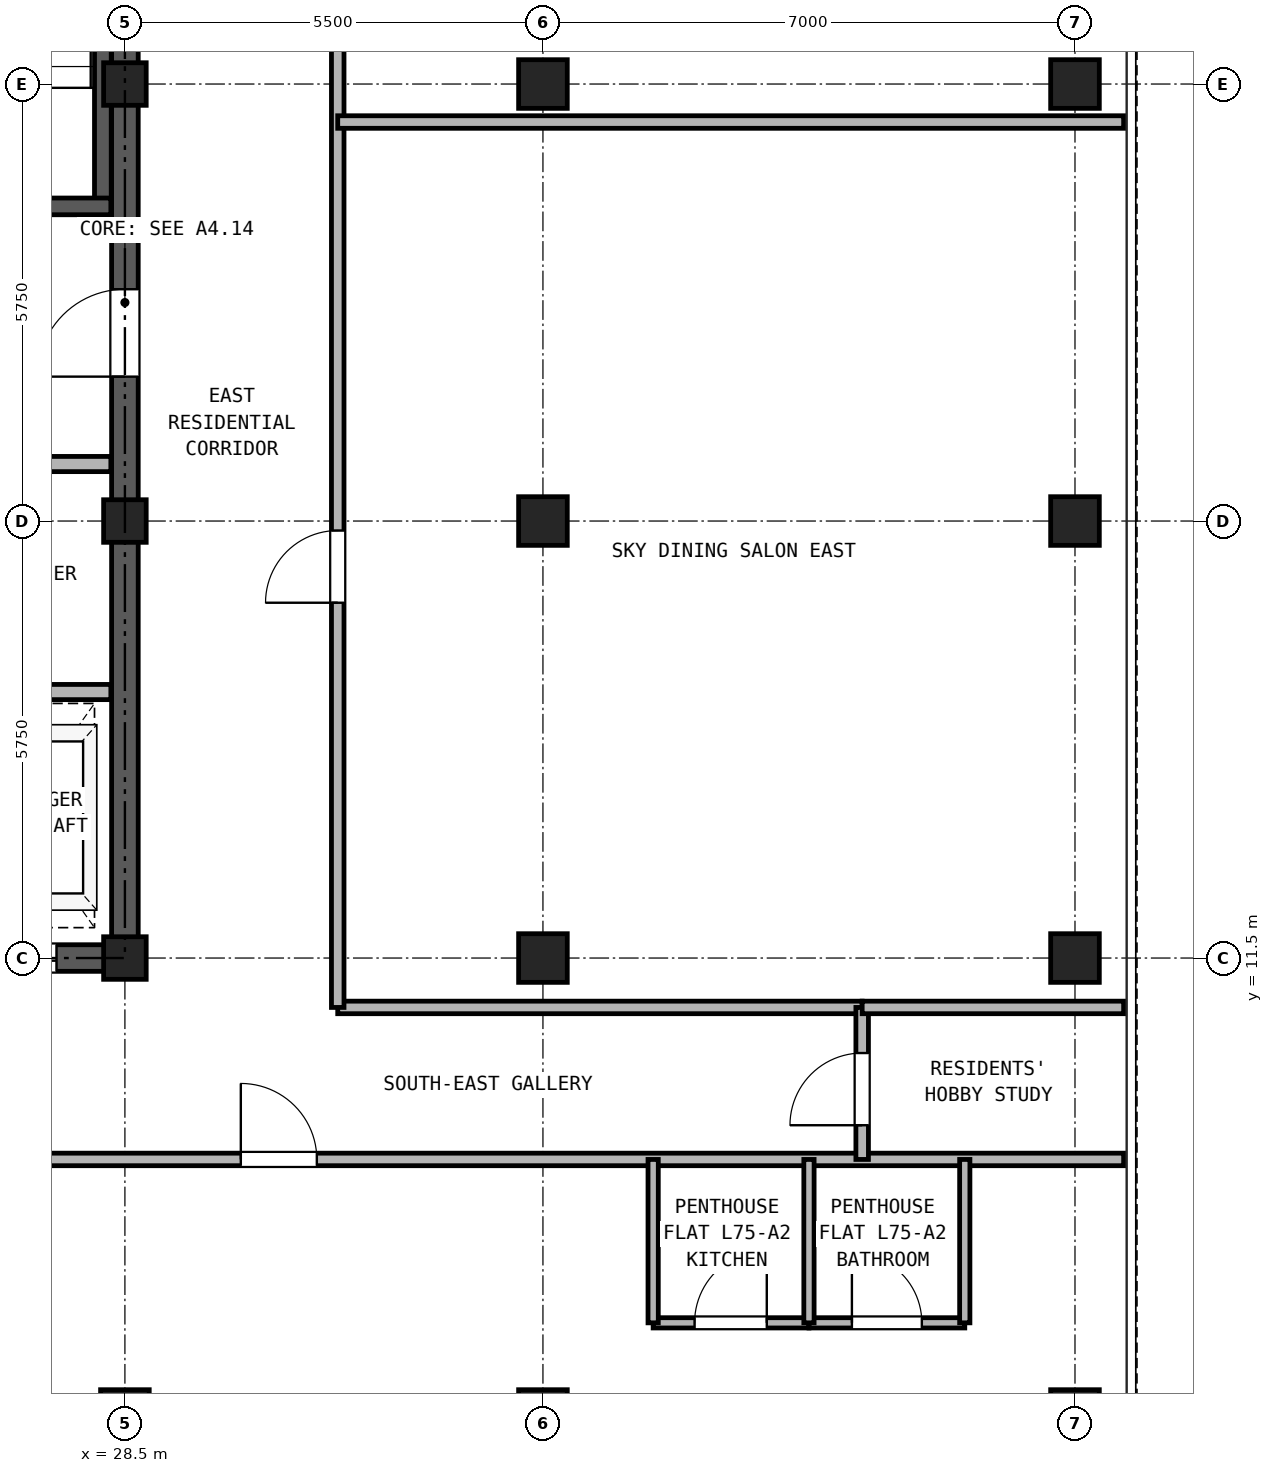
"""IFC4 building model, lengths in metres.
Left out: names, types, materials, properties, quantities, classifications, styles, units other than length and angle.
Written with IfcOpenShell. Run it as: python <this file> out.ifc"""

import sys

from ifc_helpers import new_model, si_unit, direction, frame, frame_2d, origin, origin_2d, place, context, subcontext, project, spatial, rectangle, hollow_rectangle, extrude, source, transform, mapped, element, fill, save


model = new_model("IFC4")
c1 = context("Model", 3, precision=1e-05, world=origin(), true_north=direction((0.0, 1.0)))
c2 = subcontext(c1, "Body", "Model", "MODEL_VIEW")
j1 = project(units=[si_unit("LENGTHUNIT", "METRE"), si_unit("PLANEANGLEUNIT", "RADIAN")], contexts=[c1])
p1 = place(None, origin())
s1 = spatial("IfcSite", under=j1, at=p1, CompositionType="ELEMENT")
p2 = place(p1, origin())
s2 = spatial("IfcBuilding", under=s1, at=p2, CompositionType="ELEMENT")
p3 = place(p2, frame((0.0, 0.0, 261.7)))
s3 = spatial("IfcBuildingStorey", under=s2, at=p3, CompositionType="ELEMENT", Elevation=261.7)
m1 = source(origin(), c2, "Body", "SweptSolid", [
    extrude(hollow_rectangle(XDim=0.64, YDim=0.64, WallThickness=0.035, at=origin_2d()), origin(), (0.0, 0.0, 1.0), 2.98),
])
for number, where, z_axis, x_axis in (
    (1, (41.0, 5.5, 0.0), (0.0, 0.0, 1.0), (1.0, 0.0, 0.0)),
    (2, (41.0, 11.5, 0.0), (0.0, 0.0, 1.0), (1.0, 0.0, 0.0)),
    (3, (41.0, 17.25, 0.0), (0.0, 0.0, 1.0), (1.0, 0.0, 0.0)),
    (4, (41.0, 23.0, 0.0), (0.0, 0.0, 1.0), (1.0, 0.0, 0.0)),
    (5, (28.5, 5.5, 0.0), (0.0, 0.0, 1.0), (1.0, 0.0, 0.0)),
):
    element("IfcColumn", number, at=place(p3, frame(where, z_axis=z_axis, x_axis=x_axis)), inside=s3, PredefinedType="COLUMN", context=c2, shape_type="MappedRepresentation", body=[
        mapped(m1, transform((0.0, 0.0, 0.0), x_axis=(1.0, 0.0, 0.0), y_axis=(0.0, 1.0, 0.0), z_axis=(0.0, 0.0, 1.0), scale=1.0)),
    ])
m2 = source(origin(), c2, "Body", "SweptSolid", [
    extrude(hollow_rectangle(XDim=0.56, YDim=0.56, WallThickness=0.03, at=origin_2d()), origin(), (0.0, 0.0, 1.0), 2.98),
])
for number, where, z_axis, x_axis in (
    (6, (28.5, 11.5, 0.0), (0.0, 0.0, 1.0), (1.0, 0.0, 0.0)),
    (7, (28.5, 17.25, 0.0), (0.0, 0.0, 1.0), (1.0, 0.0, 0.0)),
    (8, (28.5, 23.0, 0.0), (0.0, 0.0, 1.0), (1.0, 0.0, 0.0)),
):
    element("IfcColumn", number, at=place(p3, frame(where, z_axis=z_axis, x_axis=x_axis)), inside=s3, PredefinedType="COLUMN", context=c2, shape_type="MappedRepresentation", body=[
        mapped(m2, transform((0.0, 0.0, 0.0), x_axis=(1.0, 0.0, 0.0), y_axis=(0.0, 1.0, 0.0), z_axis=(0.0, 0.0, 1.0), scale=1.0)),
    ])
for number, where, z_axis, x_axis in (
    (9, (34.0, 5.5, 0.0), (0.0, 0.0, 1.0), (1.0, 0.0, 0.0)),
    (10, (34.0, 11.5, 0.0), (0.0, 0.0, 1.0), (1.0, 0.0, 0.0)),
    (11, (34.0, 17.25, 0.0), (0.0, 0.0, 1.0), (1.0, 0.0, 0.0)),
    (12, (34.0, 23.0, 0.0), (0.0, 0.0, 1.0), (1.0, 0.0, 0.0)),
):
    element("IfcColumn", number, at=place(p3, frame(where, z_axis=z_axis, x_axis=x_axis)), inside=s3, PredefinedType="COLUMN", context=c2, shape_type="MappedRepresentation", body=[
        mapped(m1, transform((0.0, 0.0, 0.0), x_axis=(1.0, 0.0, 0.0), y_axis=(0.0, 1.0, 0.0), z_axis=(0.0, 0.0, 1.0), scale=1.0)),
    ])
p4 = place(p3, frame((18.325, 11.5, 0.0), z_axis=(0.0, 0.0, 1.0), x_axis=(1.0, 0.0, 0.0)))
e13 = element("IfcWall", 13, at=p4, inside=s3, PredefinedType="SHEAR", context=c2, shape_type="SweptSolid", body=[
    extrude(rectangle(XDim=10.35, YDim=0.35, at=frame_2d((5.175, 0.0))), origin(), (0.0, 0.0, 1.0), 2.98),
])
p5 = place(p4, frame((1.775, 0.0, 0.0)))
e14 = element("IfcOpeningElement", 14, at=p5, cuts=e13, PredefinedType="OPENING", context=c2, shape_type="SweptSolid", body=[
    extrude(rectangle(XDim=0.95, YDim=2.15, at=frame_2d((0.475, 1.075))), frame((0.0, 0.185, 0.0), z_axis=(0.0, -1.0, 0.0), x_axis=(1.0, 0.0, 0.0)), (0.0, 0.0, 1.0), 0.37),
])
p6 = place(p4, frame((5.275, 0.0, 0.0)))
e15 = element("IfcOpeningElement", 15, at=p6, cuts=e13, PredefinedType="OPENING", context=c2, shape_type="SweptSolid", body=[
    extrude(rectangle(XDim=0.95, YDim=2.15, at=frame_2d((0.475, 1.075))), frame((0.0, 0.185, 0.0), z_axis=(0.0, -1.0, 0.0), x_axis=(1.0, 0.0, 0.0)), (0.0, 0.0, 1.0), 0.37),
])
p7 = place(p4, frame((8.175, 0.0, 0.0)))
e16 = element("IfcOpeningElement", 16, at=p7, cuts=e13, PredefinedType="OPENING", context=c2, shape_type="SweptSolid", body=[
    extrude(rectangle(XDim=1.1, YDim=2.25, at=frame_2d((0.55, 1.125))), frame((0.0, 0.185, 0.0), z_axis=(0.0, -1.0, 0.0), x_axis=(1.0, 0.0, 0.0)), (0.0, 0.0, 1.0), 0.37),
])
p8 = place(p3, frame((28.5, 11.675, 0.0), z_axis=(0.0, 0.0, 1.0), x_axis=(0.0, 1.0, 0.0)))
e17 = element("IfcWall", 17, at=p8, inside=s3, PredefinedType="SHEAR", context=c2, shape_type="SweptSolid", body=[
    extrude(rectangle(XDim=16.9, YDim=0.35, at=frame_2d((8.45, 0.0))), origin(), (0.0, 0.0, 1.0), 2.98),
])
p9 = place(p8, frame((7.475, 0.0, 0.0)))
e18 = element("IfcOpeningElement", 18, at=p9, cuts=e17, PredefinedType="OPENING", context=c2, shape_type="SweptSolid", body=[
    extrude(rectangle(XDim=1.15, YDim=2.2, at=frame_2d((0.575, 1.1))), frame((0.0, 0.185, 0.0), z_axis=(0.0, -1.0, 0.0), x_axis=(1.0, 0.0, 0.0)), (0.0, 0.0, 1.0), 0.37),
])
p10 = place(p3, frame((28.21, 21.39, 0.0), z_axis=(0.0, 0.0, 1.0), x_axis=(0.0, 1.0, 0.0)))
e19 = element("IfcWall", 19, at=p10, inside=s3, PredefinedType="SOLIDWALL", context=c2, shape_type="SweptSolid", body=[
    extrude(rectangle(XDim=6.945, YDim=0.22, at=frame_2d((3.473, 0.0))), origin(), (0.0, 0.0, 1.0), 2.98),
])
p11 = place(p3, frame((25.13, 21.39, 0.0), z_axis=(0.0, 0.0, 1.0), x_axis=(1.0, 0.0, 0.0)))
e20 = element("IfcWall", 20, at=p11, inside=s3, PredefinedType="SOLIDWALL", context=c2, shape_type="SweptSolid", body=[
    extrude(rectangle(XDim=3.185, YDim=0.22, at=frame_2d((1.593, 0.0))), origin(), (0.0, 0.0, 1.0), 2.98),
])
p12 = place(p11, frame((0.92, 0.0, 0.0)))
e21 = element("IfcOpeningElement", 21, at=p12, cuts=e20, PredefinedType="OPENING", context=c2, shape_type="SweptSolid", body=[
    extrude(rectangle(XDim=1.15, YDim=2.2, at=frame_2d((0.575, 1.1))), frame((0.0, 0.12, 0.0), z_axis=(0.0, -1.0, 0.0), x_axis=(1.0, 0.0, 0.0)), (0.0, 0.0, 1.0), 0.24),
])
p13 = place(p3, frame((18.685, 18.0, 0.0), z_axis=(0.0, 0.0, 1.0), x_axis=(1.0, 0.0, 0.0)))
e22 = element("IfcWall", 22, at=p13, inside=s3, PredefinedType="PARTITIONING", context=c2, shape_type="SweptSolid", body=[
    extrude(rectangle(XDim=9.63, YDim=0.2, at=frame_2d((4.815, 0.0))), origin(), (0.0, 0.0, 1.0), 2.98),
])
p14 = place(p13, frame((0.565, 0.0, 0.0)))
e23 = element("IfcOpeningElement", 23, at=p14, cuts=e22, PredefinedType="OPENING", context=c2, shape_type="SweptSolid", body=[
    extrude(rectangle(XDim=1.3, YDim=2.3, at=frame_2d((0.65, 1.15))), frame((0.0, 0.11, 0.0), z_axis=(0.0, -1.0, 0.0), x_axis=(1.0, 0.0, 0.0)), (0.0, 0.0, 1.0), 0.22),
])
p15 = place(p13, frame((2.665, 0.0, 0.0)))
e24 = element("IfcOpeningElement", 24, at=p15, cuts=e22, PredefinedType="OPENING", context=c2, shape_type="SweptSolid", body=[
    extrude(rectangle(XDim=1.3, YDim=2.3, at=frame_2d((0.65, 1.15))), frame((0.0, 0.11, 0.0), z_axis=(0.0, -1.0, 0.0), x_axis=(1.0, 0.0, 0.0)), (0.0, 0.0, 1.0), 0.22),
])
p16 = place(p13, frame((5.065, 0.0, 0.0)))
e25 = element("IfcOpeningElement", 25, at=p16, cuts=e22, PredefinedType="OPENING", context=c2, shape_type="SweptSolid", body=[
    extrude(rectangle(XDim=0.9, YDim=2.05, at=frame_2d((0.45, 1.025))), frame((0.0, 0.11, 0.0), z_axis=(0.0, -1.0, 0.0), x_axis=(1.0, 0.0, 0.0)), (0.0, 0.0, 1.0), 0.22),
])
p17 = place(p13, frame((7.765, 0.0, 0.0)))
e26 = element("IfcOpeningElement", 26, at=p17, cuts=e22, PredefinedType="OPENING", context=c2, shape_type="SweptSolid", body=[
    extrude(rectangle(XDim=0.9, YDim=2.05, at=frame_2d((0.45, 1.025))), frame((0.0, 0.11, 0.0), z_axis=(0.0, -1.0, 0.0), x_axis=(1.0, 0.0, 0.0)), (0.0, 0.0, 1.0), 0.22),
])
p18 = place(p3, frame((18.685, 15.0, 0.0), z_axis=(0.0, 0.0, 1.0), x_axis=(1.0, 0.0, 0.0)))
e27 = element("IfcWall", 27, at=p18, inside=s3, PredefinedType="PARTITIONING", context=c2, shape_type="SweptSolid", body=[
    extrude(rectangle(XDim=9.63, YDim=0.2, at=frame_2d((4.815, 0.0))), origin(), (0.0, 0.0, 1.0), 2.98),
])
p19 = place(p3, frame((5.36, 8.85, 0.0), z_axis=(0.0, 0.0, 1.0), x_axis=(1.0, 0.0, 0.0)))
e28 = element("IfcWall", 28, at=p19, inside=s3, PredefinedType="PARTITIONING", context=c2, shape_type="SweptSolid", body=[
    extrude(rectangle(XDim=36.28, YDim=0.165, at=frame_2d((18.14, 0.0))), origin(), (0.0, 0.0, 1.0), 2.98),
])
p20 = place(p19, frame((9.17, 0.0, 0.0)))
e29 = element("IfcOpeningElement", 29, at=p20, cuts=e28, PredefinedType="OPENING", context=c2, shape_type="SweptSolid", body=[
    extrude(rectangle(XDim=1.0, YDim=2.15, at=frame_2d((0.5, 1.075))), frame((0.0, 0.093, 0.0), z_axis=(0.0, -1.0, 0.0), x_axis=(1.0, 0.0, 0.0)), (0.0, 0.0, 1.0), 0.185),
])
p21 = place(p19, frame((24.665, 0.0, 0.0)))
e30 = element("IfcOpeningElement", 30, at=p21, cuts=e28, PredefinedType="OPENING", context=c2, shape_type="SweptSolid", body=[
    extrude(rectangle(XDim=1.0, YDim=2.15, at=frame_2d((0.5, 1.075))), frame((0.0, 0.093, 0.0), z_axis=(0.0, -1.0, 0.0), x_axis=(1.0, 0.0, 0.0)), (0.0, 0.0, 1.0), 0.185),
])
p22 = place(p3, frame((31.3, 10.85, 0.0), z_axis=(0.0, 0.0, 1.0), x_axis=(1.0, 0.0, 0.0)))
e31 = element("IfcWall", 31, at=p22, inside=s3, PredefinedType="PARTITIONING", context=c2, shape_type="SweptSolid", body=[
    extrude(rectangle(XDim=6.9, YDim=0.165, at=frame_2d((3.45, 0.0))), origin(), (0.0, 0.0, 1.0), 2.98),
])
p23 = place(p3, frame((38.2, 8.85, 0.0), z_axis=(0.0, 0.0, 1.0), x_axis=(0.0, 1.0, 0.0)))
e32 = element("IfcWall", 32, at=p23, inside=s3, PredefinedType="PARTITIONING", context=c2, shape_type="SweptSolid", body=[
    extrude(rectangle(XDim=2.0, YDim=0.165, at=frame_2d((1.0, 0.0))), origin(), (0.0, 0.0, 1.0), 2.98),
])
p24 = place(p23, frame((0.45, 0.0, 0.0)))
e33 = element("IfcOpeningElement", 33, at=p24, cuts=e32, PredefinedType="OPENING", context=c2, shape_type="SweptSolid", body=[
    extrude(rectangle(XDim=0.95, YDim=2.15, at=frame_2d((0.475, 1.075))), frame((0.0, 0.093, 0.0), z_axis=(0.0, -1.0, 0.0), x_axis=(1.0, 0.0, 0.0)), (0.0, 0.0, 1.0), 0.185),
])
p25 = place(p3, frame((31.3, 10.85, 0.0), z_axis=(0.0, 0.0, 1.0), x_axis=(0.0, 1.0, 0.0)))
e34 = element("IfcWall", 34, at=p25, inside=s3, PredefinedType="PARTITIONING", context=c2, shape_type="SweptSolid", body=[
    extrude(rectangle(XDim=24.29, YDim=0.165, at=frame_2d((12.145, 0.0))), origin(), (0.0, 0.0, 1.0), 2.98),
])
p26 = place(p25, frame((5.325, 0.0, 0.0)))
e35 = element("IfcOpeningElement", 35, at=p26, cuts=e34, PredefinedType="OPENING", context=c2, shape_type="SweptSolid", body=[
    extrude(rectangle(XDim=0.95, YDim=2.15, at=frame_2d((0.475, 1.075))), frame((0.0, 0.093, 0.0), z_axis=(0.0, -1.0, 0.0), x_axis=(1.0, 0.0, 0.0)), (0.0, 0.0, 1.0), 0.185),
])
p27 = place(p25, frame((14.65, 0.0, 0.0)))
e36 = element("IfcOpeningElement", 36, at=p27, cuts=e34, PredefinedType="OPENING", context=c2, shape_type="SweptSolid", body=[
    extrude(rectangle(XDim=0.95, YDim=2.15, at=frame_2d((0.475, 1.075))), frame((0.0, 0.093, 0.0), z_axis=(0.0, -1.0, 0.0), x_axis=(1.0, 0.0, 0.0)), (0.0, 0.0, 1.0), 0.185),
])
p28 = place(p25, frame((20.97, 0.0, 0.0)))
e37 = element("IfcOpeningElement", 37, at=p28, cuts=e34, PredefinedType="OPENING", context=c2, shape_type="SweptSolid", body=[
    extrude(rectangle(XDim=0.95, YDim=2.15, at=frame_2d((0.475, 1.075))), frame((0.0, 0.093, 0.0), z_axis=(0.0, -1.0, 0.0), x_axis=(1.0, 0.0, 0.0)), (0.0, 0.0, 1.0), 0.185),
])
p29 = place(p3, frame((35.45, 6.7, 0.0), z_axis=(0.0, 0.0, 1.0), x_axis=(1.0, 0.0, 0.0)))
e38 = element("IfcWall", 38, at=p29, inside=s3, PredefinedType="PARTITIONING", context=c2, shape_type="SweptSolid", body=[
    extrude(rectangle(XDim=2.05, YDim=0.135, at=frame_2d((1.025, 0.0))), origin(), (0.0, 0.0, 1.0), 2.98),
])
p30 = place(p29, frame((0.545, 0.0, 0.0)))
e39 = element("IfcOpeningElement", 39, at=p30, cuts=e38, PredefinedType="OPENING", context=c2, shape_type="SweptSolid", body=[
    extrude(rectangle(XDim=0.95, YDim=2.15, at=frame_2d((0.475, 1.075))), frame((0.0, 0.077, 0.0), z_axis=(0.0, -1.0, 0.0), x_axis=(1.0, 0.0, 0.0)), (0.0, 0.0, 1.0), 0.155),
])
p31 = place(p3, frame((37.5, 6.7, 0.0), z_axis=(0.0, 0.0, 1.0), x_axis=(1.0, 0.0, 0.0)))
e40 = element("IfcWall", 40, at=p31, inside=s3, PredefinedType="PARTITIONING", context=c2, shape_type="SweptSolid", body=[
    extrude(rectangle(XDim=2.05, YDim=0.135, at=frame_2d((1.025, 0.0))), origin(), (0.0, 0.0, 1.0), 2.98),
])
p32 = place(p31, frame((0.565, 0.0, 0.0)))
e41 = element("IfcOpeningElement", 41, at=p32, cuts=e40, PredefinedType="OPENING", context=c2, shape_type="SweptSolid", body=[
    extrude(rectangle(XDim=0.92, YDim=2.1, at=frame_2d((0.46, 1.05))), frame((0.0, 0.077, 0.0), z_axis=(0.0, -1.0, 0.0), x_axis=(1.0, 0.0, 0.0)), (0.0, 0.0, 1.0), 0.155),
])
for number, where, z_axis, x_axis in (
    (42, (35.45, 6.7, 0.0), (0.0, 0.0, 1.0), (0.0, 1.0, 0.0)),
    (43, (37.5, 6.7, 0.0), (0.0, 0.0, 1.0), (0.0, 1.0, 0.0)),
    (44, (39.55, 6.7, 0.0), (0.0, 0.0, 1.0), (0.0, 1.0, 0.0)),
):
    element("IfcWall", number, at=place(p3, frame(where, z_axis=z_axis, x_axis=x_axis)), inside=s3, PredefinedType="PARTITIONING", context=c2, shape_type="SweptSolid", body=[
        extrude(rectangle(XDim=2.15, YDim=0.135, at=frame_2d((1.075, 0.0))), origin(), (0.0, 0.0, 1.0), 2.98),
    ])
p33 = place(p3, frame((38.2, 10.85, 0.0), z_axis=(0.0, 0.0, 1.0), x_axis=(1.0, 0.0, 0.0)))
e45 = element("IfcWall", 45, at=p33, inside=s3, PredefinedType="PARTITIONING", context=c2, shape_type="SweptSolid", body=[
    extrude(rectangle(XDim=3.44, YDim=0.165, at=frame_2d((1.72, 0.0))), origin(), (0.0, 0.0, 1.0), 2.98),
])
p34 = place(p3, frame((31.3, 22.5, 0.0), z_axis=(0.0, 0.0, 1.0), x_axis=(1.0, 0.0, 0.0)))
e46 = element("IfcWall", 46, at=p34, inside=s3, PredefinedType="PARTITIONING", context=c2, shape_type="SweptSolid", body=[
    extrude(rectangle(XDim=10.34, YDim=0.165, at=frame_2d((5.17, 0.0))), origin(), (0.0, 0.0, 1.0), 2.98),
])
p35 = place(p9, origin())
e47 = element("IfcDoor", 47, at=p35, inside=s3, OperationType="SINGLE_SWING_LEFT", PredefinedType="DOOR", context=c2, shape_type="SweptSolid", body=[
    extrude(rectangle(XDim=1.15, YDim=2.2, at=frame_2d((0.575, 1.1))), frame((0.0, 0.025, 0.0), z_axis=(0.0, -1.0, 0.0), x_axis=(1.0, 0.0, 0.0)), (0.0, 0.0, 1.0), 0.05),
])
fill(e18, e47)
p36 = place(p7, frame((1.1, 0.0, 0.0), z_axis=(0.0, 0.0, 1.0), x_axis=(-1.0, 0.0, 0.0)))
e48 = element("IfcDoor", 48, at=p36, inside=s3, OperationType="DOUBLE_DOOR_SLIDING", PredefinedType="DOOR", context=c2, shape_type="SweptSolid", body=[
    extrude(rectangle(XDim=1.1, YDim=2.25, at=frame_2d((0.55, 1.125))), frame((0.0, 0.025, 0.0), z_axis=(0.0, -1.0, 0.0), x_axis=(1.0, 0.0, 0.0)), (0.0, 0.0, 1.0), 0.05),
])
fill(e16, e48)
p37 = place(p30, origin())
e49 = element("IfcDoor", 49, at=p37, inside=s3, OperationType="SINGLE_SWING_RIGHT", PredefinedType="DOOR", context=c2, shape_type="SweptSolid", body=[
    extrude(rectangle(XDim=0.95, YDim=2.15, at=frame_2d((0.475, 1.075))), frame((0.0, 0.025, 0.0), z_axis=(0.0, -1.0, 0.0), x_axis=(1.0, 0.0, 0.0)), (0.0, 0.0, 1.0), 0.05),
])
fill(e39, e49)
p38 = place(p32, origin())
e50 = element("IfcDoor", 50, at=p38, inside=s3, OperationType="SINGLE_SWING_LEFT", PredefinedType="DOOR", context=c2, shape_type="SweptSolid", body=[
    extrude(rectangle(XDim=0.92, YDim=2.1, at=frame_2d((0.46, 1.05))), frame((0.0, 0.025, 0.0), z_axis=(0.0, -1.0, 0.0), x_axis=(1.0, 0.0, 0.0)), (0.0, 0.0, 1.0), 0.05),
])
fill(e41, e50)
p39 = place(p21, frame((1.0, 0.0, 0.0), z_axis=(0.0, 0.0, 1.0), x_axis=(-1.0, 0.0, 0.0)))
e51 = element("IfcDoor", 51, at=p39, inside=s3, OperationType="SINGLE_SWING_LEFT", PredefinedType="DOOR", context=c2, shape_type="SweptSolid", body=[
    extrude(rectangle(XDim=1.0, YDim=2.15, at=frame_2d((0.5, 1.075))), frame((0.0, 0.025, 0.0), z_axis=(0.0, -1.0, 0.0), x_axis=(1.0, 0.0, 0.0)), (0.0, 0.0, 1.0), 0.05),
])
fill(e30, e51)
p40 = place(p24, origin())
e52 = element("IfcDoor", 52, at=p40, inside=s3, OperationType="SINGLE_SWING_LEFT", PredefinedType="DOOR", context=c2, shape_type="SweptSolid", body=[
    extrude(rectangle(XDim=0.95, YDim=2.15, at=frame_2d((0.475, 1.075))), frame((0.0, 0.025, 0.0), z_axis=(0.0, -1.0, 0.0), x_axis=(1.0, 0.0, 0.0)), (0.0, 0.0, 1.0), 0.05),
])
fill(e33, e52)
p41 = place(p26, origin())
e53 = element("IfcDoor", 53, at=p41, inside=s3, OperationType="SINGLE_SWING_LEFT", PredefinedType="DOOR", context=c2, shape_type="SweptSolid", body=[
    extrude(rectangle(XDim=0.95, YDim=2.15, at=frame_2d((0.475, 1.075))), frame((0.0, 0.025, 0.0), z_axis=(0.0, -1.0, 0.0), x_axis=(1.0, 0.0, 0.0)), (0.0, 0.0, 1.0), 0.05),
])
fill(e35, e53)
save(model, sys.argv[1])
